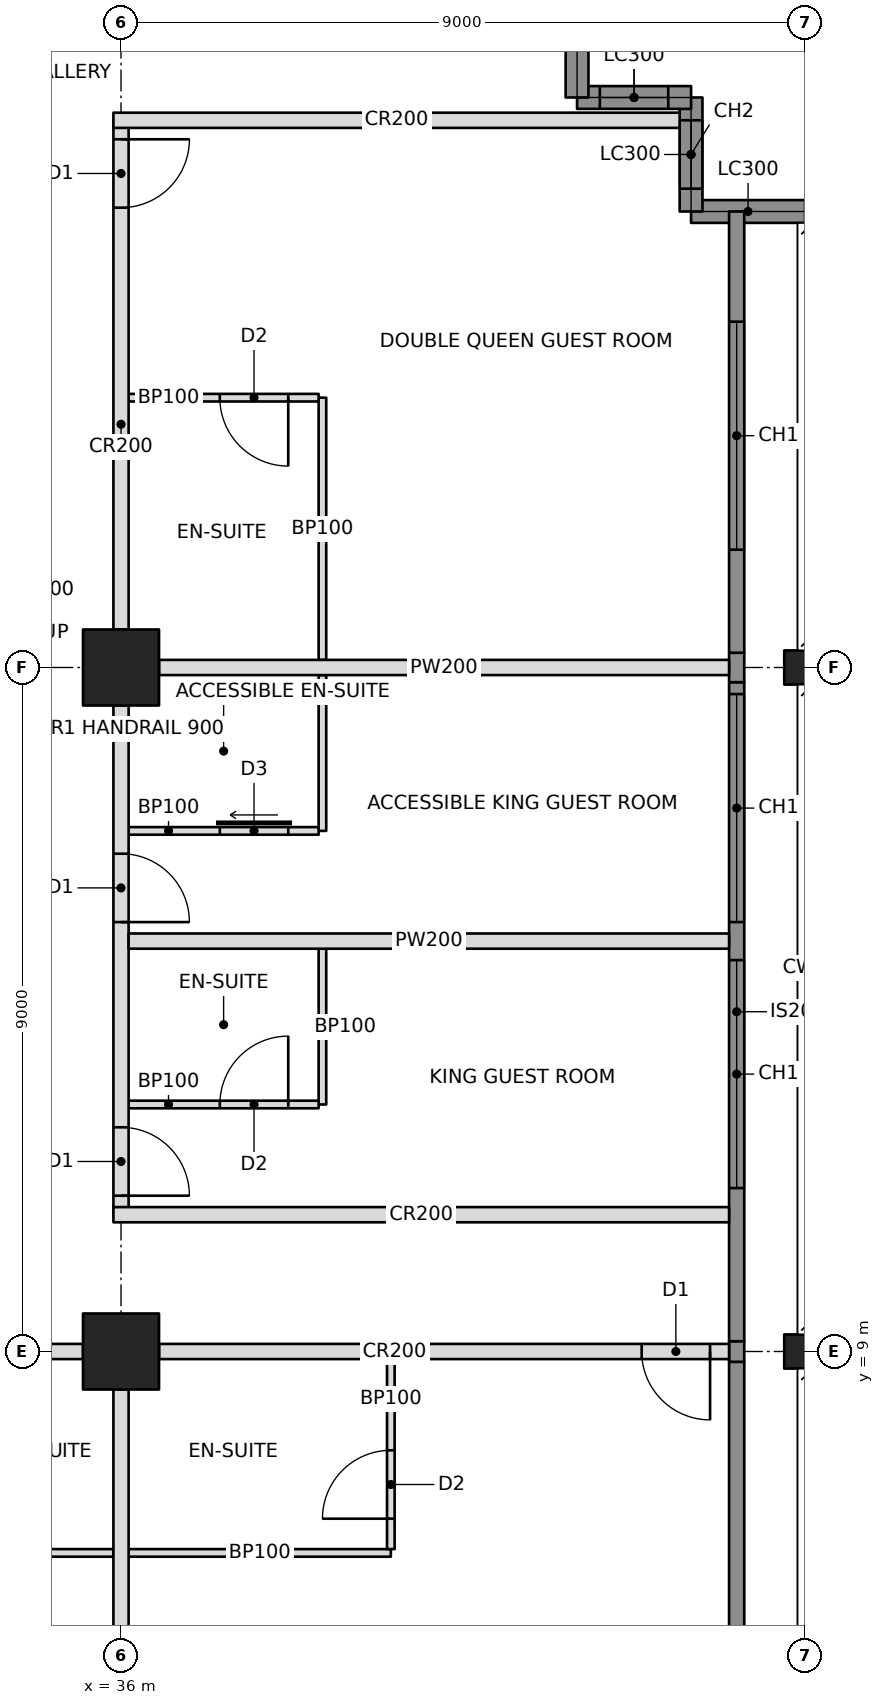
"""IFC4 building model, lengths in metres.
Left out: names, types, materials, properties, quantities, classifications, styles, units other than length and angle.
Written with IfcOpenShell. Run it as: python <this file> out.ifc"""

import sys

from ifc_helpers import new_model, si_unit, direction, frame, frame_2d, origin, origin_2d, place, context, subcontext, project, spatial, rectangle, hollow_rectangle, i_section, extrude, element, fill, save


model = new_model("IFC4")
c1 = context("Model", 3, precision=1e-05, world=origin(), true_north=direction((0.0, 1.0)))
c2 = subcontext(c1, "Body", "Model", "MODEL_VIEW")
j1 = project(units=[si_unit("LENGTHUNIT", "METRE"), si_unit("PLANEANGLEUNIT", "RADIAN")], contexts=[c1])
p1 = place(None, origin())
s1 = spatial("IfcSite", under=j1, at=p1, CompositionType="ELEMENT")
p2 = place(p1, origin())
s2 = spatial("IfcBuilding", under=s1, at=p2, CompositionType="ELEMENT")
p3 = place(p2, frame((0.0, 0.0, 163.8)))
s3 = spatial("IfcBuildingStorey", under=s2, at=p3, CompositionType="ELEMENT", Elevation=163.8)
for number, where, z_axis, x_axis in (
    (1, (36.0, 9.0, 0.0), (0.0, 0.0, 1.0), (0.0, 1.0, 0.0)),
    (2, (36.0, 18.0, 0.0), (0.0, 0.0, 1.0), (0.0, 1.0, 0.0)),
):
    element("IfcColumn", number, at=place(p3, frame(where, z_axis=z_axis, x_axis=x_axis)), inside=s3, PredefinedType="COLUMN", context=c2, shape_type="SweptSolid", body=[
        extrude(hollow_rectangle(XDim=1.0, YDim=1.0, WallThickness=0.1, at=origin_2d()), origin(), (0.0, 0.0, 1.0), 3.4),
    ])
for number, where, z_axis, x_axis in (
    (3, (45.0, 9.0, 0.0), (0.0, 0.0, 1.0), (0.0, 1.0, 0.0)),
    (4, (45.0, 18.0, 0.0), (0.0, 0.0, 1.0), (0.0, 1.0, 0.0)),
):
    element("IfcColumn", number, at=place(p3, frame(where, z_axis=z_axis, x_axis=x_axis)), inside=s3, PredefinedType="COLUMN", context=c2, shape_type="SweptSolid", body=[
        extrude(i_section(OverallWidth=0.449, OverallDepth=0.549, WebThickness=0.072, FlangeThickness=0.115, at=origin_2d()), origin(), (0.0, 0.0, 1.0), 3.4),
    ])
p4 = place(p3, frame((45.0, 24.0, 0.0), z_axis=(0.0, 0.0, 1.0), x_axis=(-1.0, 0.0, 0.0)))
e5 = element("IfcWall", 5, at=p4, inside=s3, PredefinedType="SOLIDWALL", context=c2, shape_type="SweptSolid", body=[
    extrude(rectangle(XDim=1.5, YDim=0.3, at=frame_2d((0.75, 0.0))), origin(), (0.0, 0.0, 1.0), 2.42),
])
p5 = place(p3, frame((43.5, 24.0, 0.0), z_axis=(0.0, 0.0, 1.0), x_axis=(0.0, 1.0, 0.0)))
e6 = element("IfcWall", 6, at=p5, inside=s3, PredefinedType="SOLIDWALL", context=c2, shape_type="SweptSolid", body=[
    extrude(rectangle(XDim=1.5, YDim=0.3, at=frame_2d((0.75, 0.0))), origin(), (0.0, 0.0, 1.0), 3.2),
])
p6 = place(p5, frame((0.3, 0.0, 0.6)))
e7 = element("IfcOpeningElement", 7, at=p6, cuts=e6, PredefinedType="OPENING", context=c2, shape_type="SweptSolid", body=[
    extrude(rectangle(XDim=0.9, YDim=2.2, at=frame_2d((0.45, 1.1))), frame((0.0, 0.16, 0.0), z_axis=(0.0, -1.0, 0.0), x_axis=(1.0, 0.0, 0.0)), (0.0, 0.0, 1.0), 0.32),
])
p7 = place(p3, frame((43.5, 25.5, 0.0), z_axis=(0.0, 0.0, 1.0), x_axis=(-1.0, 0.0, 0.0)))
e8 = element("IfcWall", 8, at=p7, inside=s3, PredefinedType="SOLIDWALL", context=c2, shape_type="SweptSolid", body=[
    extrude(rectangle(XDim=1.5, YDim=0.3, at=frame_2d((0.75, 0.0))), origin(), (0.0, 0.0, 1.0), 3.2),
])
p8 = place(p7, frame((0.3, 0.0, 0.6)))
e9 = element("IfcOpeningElement", 9, at=p8, cuts=e8, PredefinedType="OPENING", context=c2, shape_type="SweptSolid", body=[
    extrude(rectangle(XDim=0.9, YDim=2.2, at=frame_2d((0.45, 1.1))), frame((0.0, 0.16, 0.0), z_axis=(0.0, -1.0, 0.0), x_axis=(1.0, 0.0, 0.0)), (0.0, 0.0, 1.0), 0.32),
])
p9 = place(p3, frame((42.0, 25.5, 0.0), z_axis=(0.0, 0.0, 1.0), x_axis=(0.0, 1.0, 0.0)))
e10 = element("IfcWall", 10, at=p9, inside=s3, PredefinedType="SOLIDWALL", context=c2, shape_type="SweptSolid", body=[
    extrude(rectangle(XDim=1.5, YDim=0.3, at=frame_2d((0.75, 0.0))), origin(), (0.0, 0.0, 1.0), 2.42),
])
p10 = place(p3, frame((31.6, 9.0, 0.0), z_axis=(0.0, 0.0, 1.0), x_axis=(1.0, 0.0, 0.0)))
e11 = element("IfcWall", 11, at=p10, inside=s3, PredefinedType="PARTITIONING", context=c2, shape_type="SweptSolid", body=[
    extrude(rectangle(XDim=3.9, YDim=0.2, at=frame_2d((1.95, 0.0))), origin(), (0.0, 0.0, 1.0), 2.405),
])
p11 = place(p10, frame((0.15, 0.0, 0.0)))
e12 = element("IfcOpeningElement", 12, at=p11, cuts=e11, PredefinedType="OPENING", context=c2, shape_type="SweptSolid", body=[
    extrude(rectangle(XDim=0.9, YDim=2.1, at=frame_2d((0.45, 1.05))), frame((0.0, 0.11, 0.0), z_axis=(0.0, -1.0, 0.0), x_axis=(1.0, 0.0, 0.0)), (0.0, 0.0, 1.0), 0.22),
])
p12 = place(p3, frame((36.5, 9.0, 0.0), z_axis=(0.0, 0.0, 1.0), x_axis=(1.0, 0.0, 0.0)))
e13 = element("IfcWall", 13, at=p12, inside=s3, PredefinedType="PARTITIONING", context=c2, shape_type="SweptSolid", body=[
    extrude(rectangle(XDim=7.5, YDim=0.2, at=frame_2d((3.75, 0.0))), origin(), (0.0, 0.0, 1.0), 2.438),
])
p13 = place(p12, frame((6.35, 0.0, 0.0)))
e14 = element("IfcOpeningElement", 14, at=p13, cuts=e13, PredefinedType="OPENING", context=c2, shape_type="SweptSolid", body=[
    extrude(rectangle(XDim=0.9, YDim=2.1, at=frame_2d((0.45, 1.05))), frame((0.0, 0.11, 0.0), z_axis=(0.0, -1.0, 0.0), x_axis=(1.0, 0.0, 0.0)), (0.0, 0.0, 1.0), 0.22),
])
p14 = place(p3, frame((36.0, 10.8, 0.0), z_axis=(0.0, 0.0, 1.0), x_axis=(0.0, 1.0, 0.0)))
e15 = element("IfcWall", 15, at=p14, inside=s3, PredefinedType="PARTITIONING", context=c2, shape_type="SweptSolid", body=[
    extrude(rectangle(XDim=6.7, YDim=0.2, at=frame_2d((3.35, 0.0))), origin(), (0.0, 0.0, 1.0), 2.405),
])
p15 = place(p14, frame((0.25, 0.0, 0.0)))
e16 = element("IfcOpeningElement", 16, at=p15, cuts=e15, PredefinedType="OPENING", context=c2, shape_type="SweptSolid", body=[
    extrude(rectangle(XDim=0.9, YDim=2.1, at=frame_2d((0.45, 1.05))), frame((0.0, 0.11, 0.0), z_axis=(0.0, -1.0, 0.0), x_axis=(1.0, 0.0, 0.0)), (0.0, 0.0, 1.0), 0.22),
])
p16 = place(p14, frame((3.85, 0.0, 0.0)))
e17 = element("IfcOpeningElement", 17, at=p16, cuts=e15, PredefinedType="OPENING", context=c2, shape_type="SweptSolid", body=[
    extrude(rectangle(XDim=0.9, YDim=2.1, at=frame_2d((0.45, 1.05))), frame((0.0, 0.11, 0.0), z_axis=(0.0, -1.0, 0.0), x_axis=(1.0, 0.0, 0.0)), (0.0, 0.0, 1.0), 0.22),
])
p17 = place(p3, frame((36.0, 18.5, 0.0), z_axis=(0.0, 0.0, 1.0), x_axis=(0.0, 1.0, 0.0)))
e18 = element("IfcWall", 18, at=p17, inside=s3, PredefinedType="PARTITIONING", context=c2, shape_type="SweptSolid", body=[
    extrude(rectangle(XDim=6.7, YDim=0.2, at=frame_2d((3.35, 0.0))), origin(), (0.0, 0.0, 1.0), 2.405),
])
p18 = place(p17, frame((5.55, 0.0, 0.0)))
e19 = element("IfcOpeningElement", 19, at=p18, cuts=e18, PredefinedType="OPENING", context=c2, shape_type="SweptSolid", body=[
    extrude(rectangle(XDim=0.9, YDim=2.1, at=frame_2d((0.45, 1.05))), frame((0.0, 0.11, 0.0), z_axis=(0.0, -1.0, 0.0), x_axis=(1.0, 0.0, 0.0)), (0.0, 0.0, 1.0), 0.22),
])
p19 = place(p3, frame((35.9, 10.8, 0.0), z_axis=(0.0, 0.0, 1.0), x_axis=(1.0, 0.0, 0.0)))
e20 = element("IfcWall", 20, at=p19, inside=s3, PredefinedType="PARTITIONING", context=c2, shape_type="SweptSolid", body=[
    extrude(rectangle(XDim=8.1, YDim=0.2, at=frame_2d((4.05, 0.0))), origin(), (0.0, 0.0, 1.0), 2.404),
])
p20 = place(p3, frame((35.9, 25.2, 0.0), z_axis=(0.0, 0.0, 1.0), x_axis=(1.0, 0.0, 0.0)))
e21 = element("IfcWall", 21, at=p20, inside=s3, PredefinedType="PARTITIONING", context=c2, shape_type="SweptSolid", body=[
    extrude(rectangle(XDim=7.45, YDim=0.2, at=frame_2d((3.725, 0.0))), origin(), (0.0, 0.0, 1.0), 2.404),
])
p21 = place(p3, frame((36.0, 8.5, 0.0), z_axis=(0.0, 0.0, 1.0), x_axis=(0.0, -1.0, 0.0)))
e22 = element("IfcWall", 22, at=p21, inside=s3, PredefinedType="PARTITIONING", context=c2, shape_type="SweptSolid", body=[
    extrude(rectangle(XDim=7.5, YDim=0.2, at=frame_2d((3.75, 0.0))), origin(), (0.0, 0.0, 1.0), 2.438),
])
p22 = place(p3, frame((32.95, 6.35, 0.0), z_axis=(0.0, 0.0, 1.0), x_axis=(1.0, 0.0, 0.0)))
e23 = element("IfcWall", 23, at=p22, inside=s3, PredefinedType="PARTITIONING", context=c2, shape_type="SweptSolid", body=[
    extrude(rectangle(XDim=2.95, YDim=0.1, at=frame_2d((1.475, 0.0))), origin(), (0.0, 0.0, 1.0), 2.438),
])
p23 = place(p3, frame((36.1, 6.35, 0.0), z_axis=(0.0, 0.0, 1.0), x_axis=(1.0, 0.0, 0.0)))
e24 = element("IfcWall", 24, at=p23, inside=s3, PredefinedType="PARTITIONING", context=c2, shape_type="SweptSolid", body=[
    extrude(rectangle(XDim=3.45, YDim=0.1, at=frame_2d((1.725, 0.0))), origin(), (0.0, 0.0, 1.0), 2.438),
])
p24 = place(p3, frame((39.55, 8.9, 0.0), z_axis=(0.0, 0.0, 1.0), x_axis=(0.0, -1.0, 0.0)))
e25 = element("IfcWall", 25, at=p24, inside=s3, PredefinedType="PARTITIONING", context=c2, shape_type="SweptSolid", body=[
    extrude(rectangle(XDim=2.5, YDim=0.1, at=frame_2d((1.25, 0.0))), origin(), (0.0, 0.0, 1.0), 2.438),
])
p25 = place(p24, frame((1.2, 0.0, 0.0)))
e26 = element("IfcOpeningElement", 26, at=p25, cuts=e25, PredefinedType="OPENING", context=c2, shape_type="SweptSolid", body=[
    extrude(rectangle(XDim=0.9, YDim=2.1, at=frame_2d((0.45, 1.05))), frame((0.0, 0.06, 0.0), z_axis=(0.0, -1.0, 0.0), x_axis=(1.0, 0.0, 0.0)), (0.0, 0.0, 1.0), 0.12),
])
p26 = place(p3, frame((36.1, 14.4, 0.0), z_axis=(0.0, 0.0, 1.0), x_axis=(1.0, 0.0, 0.0)))
e27 = element("IfcWall", 27, at=p26, inside=s3, PredefinedType="PARTITIONING", context=c2, shape_type="SweptSolid", body=[
    extrude(rectangle(XDim=7.9, YDim=0.2, at=frame_2d((3.95, 0.0))), origin(), (0.0, 0.0, 1.0), 2.404),
])
p27 = place(p3, frame((36.5, 18.0, 0.0), z_axis=(0.0, 0.0, 1.0), x_axis=(1.0, 0.0, 0.0)))
e28 = element("IfcWall", 28, at=p27, inside=s3, PredefinedType="PARTITIONING", context=c2, shape_type="SweptSolid", body=[
    extrude(rectangle(XDim=7.5, YDim=0.2, at=frame_2d((3.75, 0.0))), origin(), (0.0, 0.0, 1.0), 2.405),
])
p28 = place(p3, frame((38.65, 12.25, 0.0), z_axis=(0.0, 0.0, 1.0), x_axis=(0.0, 1.0, 0.0)))
e29 = element("IfcWall", 29, at=p28, inside=s3, PredefinedType="PARTITIONING", context=c2, shape_type="SweptSolid", body=[
    extrude(rectangle(XDim=2.05, YDim=0.1, at=frame_2d((1.025, 0.0))), origin(), (0.0, 0.0, 1.0), 3.2),
])
p29 = place(p3, frame((36.1, 12.25, 0.0), z_axis=(0.0, 0.0, 1.0), x_axis=(1.0, 0.0, 0.0)))
e30 = element("IfcWall", 30, at=p29, inside=s3, PredefinedType="PARTITIONING", context=c2, shape_type="SweptSolid", body=[
    extrude(rectangle(XDim=2.5, YDim=0.1, at=frame_2d((1.25, 0.0))), origin(), (0.0, 0.0, 1.0), 2.404),
])
p30 = place(p29, frame((1.2, 0.0, 0.0)))
e31 = element("IfcOpeningElement", 31, at=p30, cuts=e30, PredefinedType="OPENING", context=c2, shape_type="SweptSolid", body=[
    extrude(rectangle(XDim=0.9, YDim=2.1, at=frame_2d((0.45, 1.05))), frame((0.0, 0.06, 0.0), z_axis=(0.0, -1.0, 0.0), x_axis=(1.0, 0.0, 0.0)), (0.0, 0.0, 1.0), 0.12),
])
p31 = place(p3, frame((38.65, 15.85, 0.0), z_axis=(0.0, 0.0, 1.0), x_axis=(0.0, 1.0, 0.0)))
e32 = element("IfcWall", 32, at=p31, inside=s3, PredefinedType="PARTITIONING", context=c2, shape_type="SweptSolid", body=[
    extrude(rectangle(XDim=2.05, YDim=0.1, at=frame_2d((1.025, 0.0))), origin(), (0.0, 0.0, 1.0), 2.404),
])
p32 = place(p3, frame((36.1, 15.85, 0.0), z_axis=(0.0, 0.0, 1.0), x_axis=(1.0, 0.0, 0.0)))
e33 = element("IfcWall", 33, at=p32, inside=s3, PredefinedType="PARTITIONING", context=c2, shape_type="SweptSolid", body=[
    extrude(rectangle(XDim=2.5, YDim=0.1, at=frame_2d((1.25, 0.0))), origin(), (0.0, 0.0, 1.0), 2.404),
])
p33 = place(p32, frame((1.2, 0.0, 0.0)))
e34 = element("IfcOpeningElement", 34, at=p33, cuts=e33, PredefinedType="OPENING", context=c2, shape_type="SweptSolid", body=[
    extrude(rectangle(XDim=0.9, YDim=2.1, at=frame_2d((0.45, 1.05))), frame((0.0, 0.06, 0.0), z_axis=(0.0, -1.0, 0.0), x_axis=(1.0, 0.0, 0.0)), (0.0, 0.0, 1.0), 0.12),
])
p34 = place(p3, frame((38.65, 18.1, 0.0), z_axis=(0.0, 0.0, 1.0), x_axis=(0.0, 1.0, 0.0)))
e35 = element("IfcWall", 35, at=p34, inside=s3, PredefinedType="PARTITIONING", context=c2, shape_type="SweptSolid", body=[
    extrude(rectangle(XDim=3.45, YDim=0.1, at=frame_2d((1.725, 0.0))), origin(), (0.0, 0.0, 1.0), 2.404),
])
p35 = place(p3, frame((36.1, 21.55, 0.0), z_axis=(0.0, 0.0, 1.0), x_axis=(1.0, 0.0, 0.0)))
e36 = element("IfcWall", 36, at=p35, inside=s3, PredefinedType="PARTITIONING", context=c2, shape_type="SweptSolid", body=[
    extrude(rectangle(XDim=2.5, YDim=0.1, at=frame_2d((1.25, 0.0))), origin(), (0.0, 0.0, 1.0), 2.404),
])
p36 = place(p35, frame((1.2, 0.0, 0.0)))
e37 = element("IfcOpeningElement", 37, at=p36, cuts=e36, PredefinedType="OPENING", context=c2, shape_type="SweptSolid", body=[
    extrude(rectangle(XDim=0.9, YDim=2.1, at=frame_2d((0.45, 1.05))), frame((0.0, 0.06, 0.0), z_axis=(0.0, -1.0, 0.0), x_axis=(1.0, 0.0, 0.0)), (0.0, 0.0, 1.0), 0.12),
])
p37 = place(p3, frame((44.1, 4.607, 0.0), z_axis=(0.0, 0.0, 1.0), x_axis=(0.0, 1.0, 0.0)))
e38 = element("IfcWall", 38, at=p37, inside=s3, PredefinedType="SOLIDWALL", context=c2, shape_type="SweptSolid", body=[
    extrude(rectangle(XDim=4.257, YDim=0.2, at=frame_2d((2.129, 0.0))), origin(), (0.0, 0.0, 1.0), 3.2),
])
p38 = place(p3, frame((44.1, 8.865, 0.0), z_axis=(0.0, 0.0, 1.0), x_axis=(0.0, 1.0, 0.0)))
e39 = element("IfcWall", 39, at=p38, inside=s3, PredefinedType="SOLIDWALL", context=c2, shape_type="SweptSolid", body=[
    extrude(rectangle(XDim=0.271, YDim=0.2, at=frame_2d((0.135, 0.0))), origin(), (0.0, 0.0, 1.0), 2.438),
])
p39 = place(p3, frame((44.1, 9.135, 0.0), z_axis=(0.0, 0.0, 1.0), x_axis=(0.0, 1.0, 0.0)))
e40 = element("IfcWall", 40, at=p39, inside=s3, PredefinedType="SOLIDWALL", context=c2, shape_type="SweptSolid", body=[
    extrude(rectangle(XDim=8.671, YDim=0.2, at=frame_2d((4.335, 0.0))), origin(), (0.0, 0.0, 1.0), 3.2),
])
p40 = place(p39, frame((2.015, 0.0, 0.6)))
e41 = element("IfcOpeningElement", 41, at=p40, cuts=e40, PredefinedType="OPENING", context=c2, shape_type="SweptSolid", body=[
    extrude(rectangle(XDim=3.0, YDim=2.2, at=frame_2d((1.5, 1.1))), frame((0.0, 0.11, 0.0), z_axis=(0.0, -1.0, 0.0), x_axis=(1.0, 0.0, 0.0)), (0.0, 0.0, 1.0), 0.22),
])
p41 = place(p39, frame((5.515, 0.0, 0.6)))
e42 = element("IfcOpeningElement", 42, at=p41, cuts=e40, PredefinedType="OPENING", context=c2, shape_type="SweptSolid", body=[
    extrude(rectangle(XDim=3.0, YDim=2.2, at=frame_2d((1.5, 1.1))), frame((0.0, 0.11, 0.0), z_axis=(0.0, -1.0, 0.0), x_axis=(1.0, 0.0, 0.0)), (0.0, 0.0, 1.0), 0.22),
])
p42 = place(p3, frame((44.1, 17.806, 0.0), z_axis=(0.0, 0.0, 1.0), x_axis=(0.0, 1.0, 0.0)))
e43 = element("IfcWall", 43, at=p42, inside=s3, PredefinedType="SOLIDWALL", context=c2, shape_type="SweptSolid", body=[
    extrude(rectangle(XDim=0.388, YDim=0.2, at=frame_2d((0.194, 0.0))), origin(), (0.0, 0.0, 1.0), 2.404),
])
p43 = place(p3, frame((44.1, 18.194, 0.0), z_axis=(0.0, 0.0, 1.0), x_axis=(0.0, 1.0, 0.0)))
e44 = element("IfcWall", 44, at=p43, inside=s3, PredefinedType="SOLIDWALL", context=c2, shape_type="SweptSolid", body=[
    extrude(rectangle(XDim=5.806, YDim=0.2, at=frame_2d((2.903, 0.0))), origin(), (0.0, 0.0, 1.0), 3.2),
])
p44 = place(p43, frame((1.356, 0.0, 0.6)))
e45 = element("IfcOpeningElement", 45, at=p44, cuts=e44, PredefinedType="OPENING", context=c2, shape_type="SweptSolid", body=[
    extrude(rectangle(XDim=3.0, YDim=2.2, at=frame_2d((1.5, 1.1))), frame((0.0, 0.11, 0.0), z_axis=(0.0, -1.0, 0.0), x_axis=(1.0, 0.0, 0.0)), (0.0, 0.0, 1.0), 0.22),
])
p45 = place(p6, origin())
e46 = element("IfcWindow", 46, at=p45, inside=s3, PartitioningType="SINGLE_PANEL", PredefinedType="WINDOW", context=c2, shape_type="SweptSolid", body=[
    extrude(rectangle(XDim=0.9, YDim=2.2, at=frame_2d((0.45, 1.1))), frame((0.0, 0.03, 0.0), z_axis=(0.0, -1.0, 0.0), x_axis=(1.0, 0.0, 0.0)), (0.0, 0.0, 1.0), 0.06),
])
fill(e7, e46)
p46 = place(p8, origin())
e47 = element("IfcWindow", 47, at=p46, inside=s3, PartitioningType="SINGLE_PANEL", PredefinedType="WINDOW", context=c2, shape_type="SweptSolid", body=[
    extrude(rectangle(XDim=0.9, YDim=2.2, at=frame_2d((0.45, 1.1))), frame((0.0, 0.03, 0.0), z_axis=(0.0, -1.0, 0.0), x_axis=(1.0, 0.0, 0.0)), (0.0, 0.0, 1.0), 0.06),
])
fill(e9, e47)
p47 = place(p40, origin())
e48 = element("IfcWindow", 48, at=p47, inside=s3, PartitioningType="TRIPLE_PANEL_VERTICAL", PredefinedType="WINDOW", context=c2, shape_type="SweptSolid", body=[
    extrude(rectangle(XDim=3.0, YDim=2.2, at=frame_2d((1.5, 1.1))), frame((0.0, 0.03, 0.0), z_axis=(0.0, -1.0, 0.0), x_axis=(1.0, 0.0, 0.0)), (0.0, 0.0, 1.0), 0.06),
])
fill(e41, e48)
p48 = place(p41, origin())
e49 = element("IfcWindow", 49, at=p48, inside=s3, PartitioningType="TRIPLE_PANEL_VERTICAL", PredefinedType="WINDOW", context=c2, shape_type="SweptSolid", body=[
    extrude(rectangle(XDim=3.0, YDim=2.2, at=frame_2d((1.5, 1.1))), frame((0.0, 0.03, 0.0), z_axis=(0.0, -1.0, 0.0), x_axis=(1.0, 0.0, 0.0)), (0.0, 0.0, 1.0), 0.06),
])
fill(e42, e49)
p49 = place(p44, origin())
e50 = element("IfcWindow", 50, at=p49, inside=s3, PartitioningType="TRIPLE_PANEL_VERTICAL", PredefinedType="WINDOW", context=c2, shape_type="SweptSolid", body=[
    extrude(rectangle(XDim=3.0, YDim=2.2, at=frame_2d((1.5, 1.1))), frame((0.0, 0.03, 0.0), z_axis=(0.0, -1.0, 0.0), x_axis=(1.0, 0.0, 0.0)), (0.0, 0.0, 1.0), 0.06),
])
fill(e45, e50)
p50 = place(p25, frame((0.9, 0.0, 0.0), z_axis=(0.0, 0.0, 1.0), x_axis=(-1.0, 0.0, 0.0)))
e51 = element("IfcDoor", 51, at=p50, inside=s3, OperationType="SINGLE_SWING_LEFT", PredefinedType="DOOR", context=c2, shape_type="SweptSolid", body=[
    extrude(rectangle(XDim=0.9, YDim=2.1, at=frame_2d((0.45, 1.05))), frame((0.0, 0.025, 0.0), z_axis=(0.0, -1.0, 0.0), x_axis=(1.0, 0.0, 0.0)), (0.0, 0.0, 1.0), 0.05),
])
fill(e26, e51)
p51 = place(p13, frame((0.9, 0.0, 0.0), z_axis=(0.0, 0.0, 1.0), x_axis=(-1.0, 0.0, 0.0)))
e52 = element("IfcDoor", 52, at=p51, inside=s3, OperationType="SINGLE_SWING_LEFT", PredefinedType="DOOR", context=c2, shape_type="SweptSolid", body=[
    extrude(rectangle(XDim=0.9, YDim=2.1, at=frame_2d((0.45, 1.05))), frame((0.0, 0.025, 0.0), z_axis=(0.0, -1.0, 0.0), x_axis=(1.0, 0.0, 0.0)), (0.0, 0.0, 1.0), 0.05),
])
fill(e14, e52)
p52 = place(p30, origin())
e53 = element("IfcDoor", 53, at=p52, inside=s3, OperationType="SINGLE_SWING_RIGHT", PredefinedType="DOOR", context=c2, shape_type="SweptSolid", body=[
    extrude(rectangle(XDim=0.9, YDim=2.1, at=frame_2d((0.45, 1.05))), frame((0.0, 0.025, 0.0), z_axis=(0.0, -1.0, 0.0), x_axis=(1.0, 0.0, 0.0)), (0.0, 0.0, 1.0), 0.05),
])
fill(e31, e53)
p53 = place(p15, frame((0.9, 0.0, 0.0), z_axis=(0.0, 0.0, 1.0), x_axis=(-1.0, 0.0, 0.0)))
e54 = element("IfcDoor", 54, at=p53, inside=s3, OperationType="SINGLE_SWING_RIGHT", PredefinedType="DOOR", context=c2, shape_type="SweptSolid", body=[
    extrude(rectangle(XDim=0.9, YDim=2.1, at=frame_2d((0.45, 1.05))), frame((0.0, 0.025, 0.0), z_axis=(0.0, -1.0, 0.0), x_axis=(1.0, 0.0, 0.0)), (0.0, 0.0, 1.0), 0.05),
])
fill(e16, e54)
p54 = place(p33, origin())
e55 = element("IfcDoor", 55, at=p54, inside=s3, OperationType="SLIDING_TO_LEFT", PredefinedType="DOOR", context=c2, shape_type="SweptSolid", body=[
    extrude(rectangle(XDim=0.9, YDim=2.1, at=frame_2d((0.45, 1.05))), frame((0.0, 0.025, 0.0), z_axis=(0.0, -1.0, 0.0), x_axis=(1.0, 0.0, 0.0)), (0.0, 0.0, 1.0), 0.05),
])
fill(e34, e55)
p55 = place(p16, frame((0.9, 0.0, 0.0), z_axis=(0.0, 0.0, 1.0), x_axis=(-1.0, 0.0, 0.0)))
e56 = element("IfcDoor", 56, at=p55, inside=s3, OperationType="SINGLE_SWING_RIGHT", PredefinedType="DOOR", context=c2, shape_type="SweptSolid", body=[
    extrude(rectangle(XDim=0.9, YDim=2.1, at=frame_2d((0.45, 1.05))), frame((0.0, 0.025, 0.0), z_axis=(0.0, -1.0, 0.0), x_axis=(1.0, 0.0, 0.0)), (0.0, 0.0, 1.0), 0.05),
])
fill(e17, e56)
p56 = place(p36, frame((0.9, 0.0, 0.0), z_axis=(0.0, 0.0, 1.0), x_axis=(-1.0, 0.0, 0.0)))
e57 = element("IfcDoor", 57, at=p56, inside=s3, OperationType="SINGLE_SWING_LEFT", PredefinedType="DOOR", context=c2, shape_type="SweptSolid", body=[
    extrude(rectangle(XDim=0.9, YDim=2.1, at=frame_2d((0.45, 1.05))), frame((0.0, 0.025, 0.0), z_axis=(0.0, -1.0, 0.0), x_axis=(1.0, 0.0, 0.0)), (0.0, 0.0, 1.0), 0.05),
])
fill(e37, e57)
p57 = place(p18, frame((0.9, 0.0, 0.0), z_axis=(0.0, 0.0, 1.0), x_axis=(-1.0, 0.0, 0.0)))
e58 = element("IfcDoor", 58, at=p57, inside=s3, OperationType="SINGLE_SWING_LEFT", PredefinedType="DOOR", context=c2, shape_type="SweptSolid", body=[
    extrude(rectangle(XDim=0.9, YDim=2.1, at=frame_2d((0.45, 1.05))), frame((0.0, 0.025, 0.0), z_axis=(0.0, -1.0, 0.0), x_axis=(1.0, 0.0, 0.0)), (0.0, 0.0, 1.0), 0.05),
])
fill(e19, e58)
save(model, sys.argv[1])
